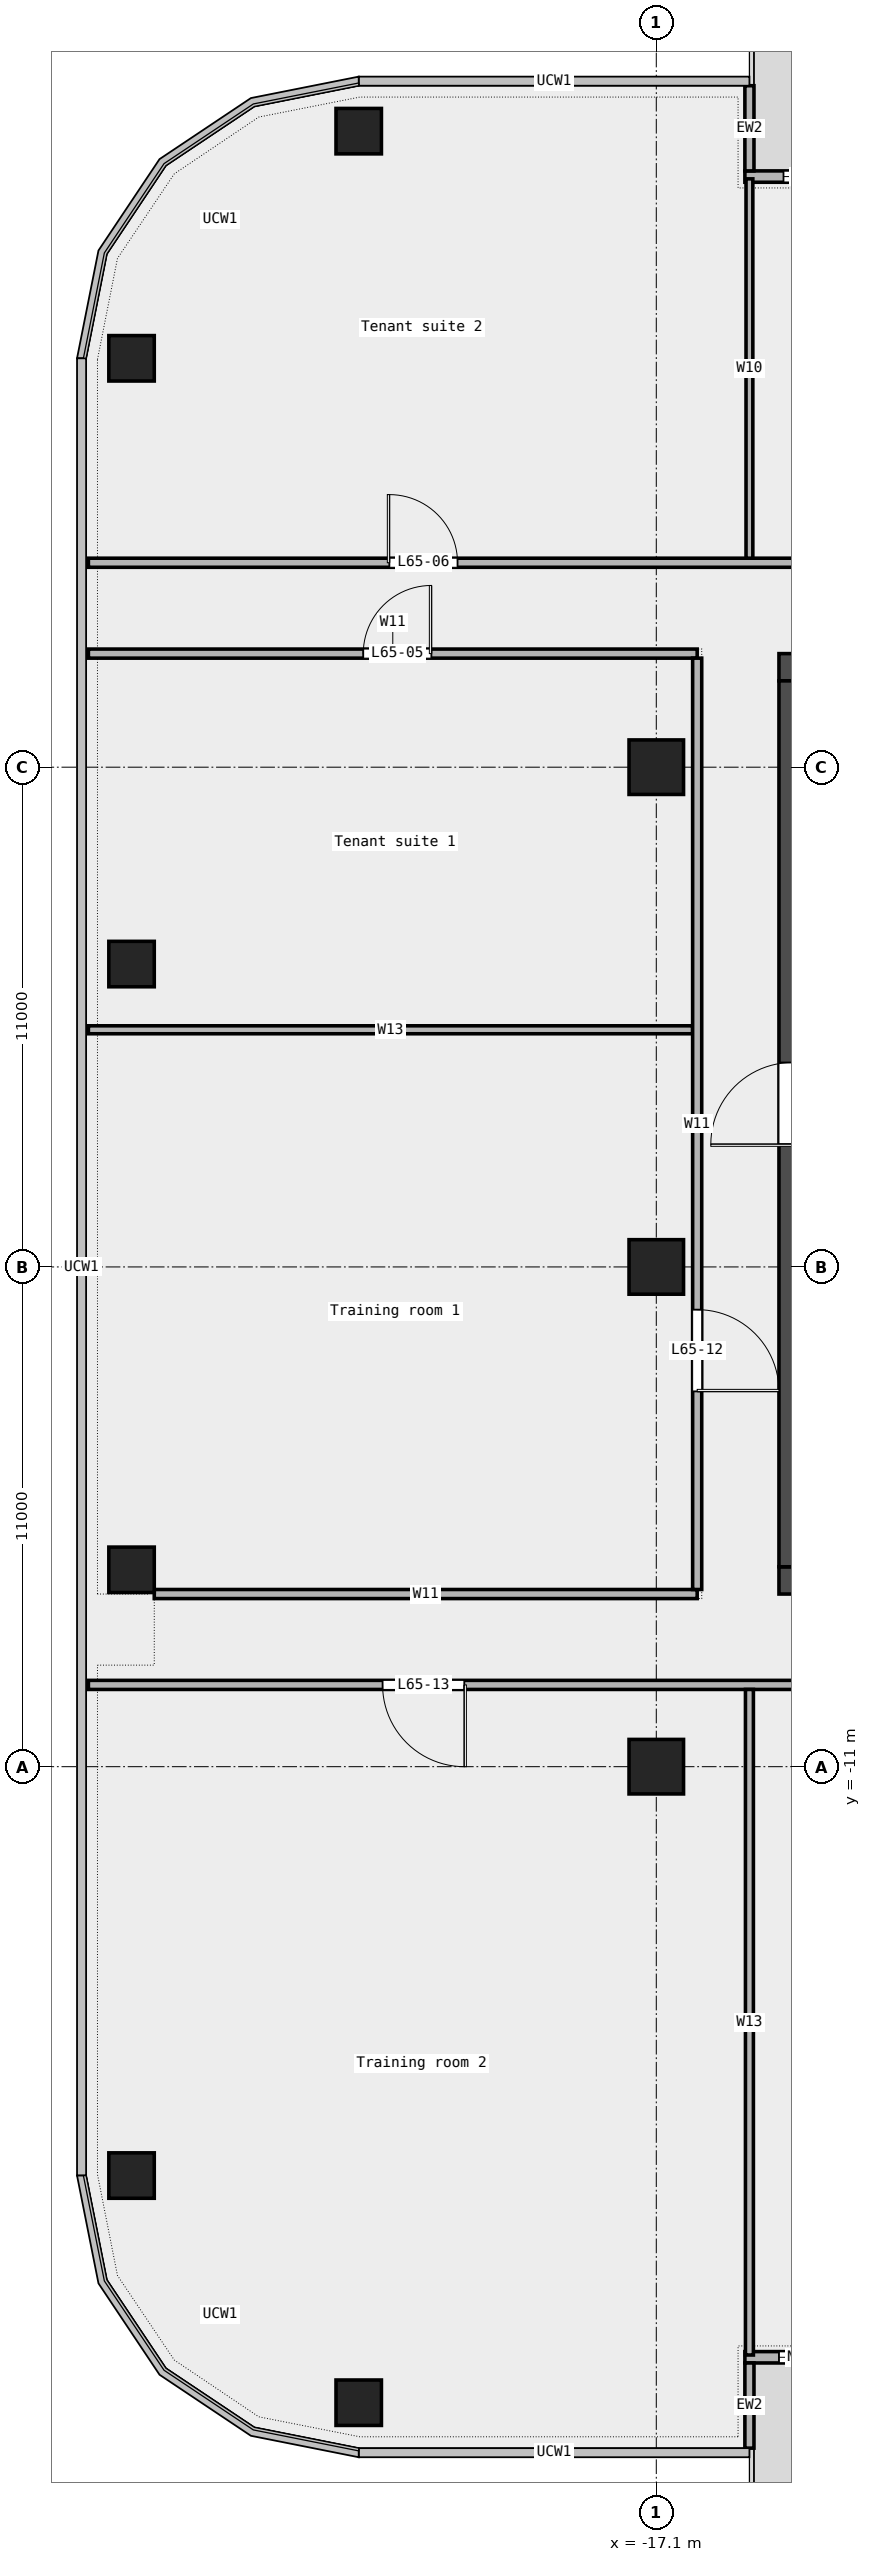
"""IFC4 building model, lengths in metres.
Left out: names, types, materials, properties, quantities, classifications, styles, units other than length and angle.
Written with IfcOpenShell. Run it as: python <this file> out.ifc"""

import sys

from ifc_helpers import new_model, si_unit, direction, frame, frame_2d, origin, origin_2d, place, context, subcontext, project, spatial, rectangle, extrude, element, fill, save


model = new_model("IFC4")
c1 = context("Model", 3, precision=1e-05, world=origin(), true_north=direction((0.0, 1.0)))
c2 = subcontext(c1, "Body", "Model", "MODEL_VIEW")
j1 = project(units=[si_unit("LENGTHUNIT", "METRE"), si_unit("PLANEANGLEUNIT", "RADIAN")], contexts=[c1])
p1 = place(None, origin())
s1 = spatial("IfcSite", under=j1, at=p1, CompositionType="ELEMENT")
p2 = place(p1, origin())
s2 = spatial("IfcBuilding", under=s1, at=p2, CompositionType="ELEMENT")
p3 = place(p2, frame((0.0, 0.0, 299.4)))
s3 = spatial("IfcBuildingStorey", under=s2, at=p3, CompositionType="ELEMENT", Elevation=299.4)
for number, where, z_axis, x_axis in (
    (1, (-23.65, -25.0, 0.0), (0.0, 0.0, 1.0), (1.0, 0.0, 0.0)),
    (2, (-23.65, 25.0, 0.0), (0.0, 0.0, 1.0), (1.0, 0.0, 0.0)),
    (3, (-28.65, 20.0, 0.0), (0.0, 0.0, 1.0), (1.0, 0.0, 0.0)),
    (4, (-28.65, 6.667, 0.0), (0.0, 0.0, 1.0), (1.0, 0.0, 0.0)),
    (5, (-28.65, -6.667, 0.0), (0.0, 0.0, 1.0), (1.0, 0.0, 0.0)),
    (6, (-28.65, -20.0, 0.0), (0.0, 0.0, 1.0), (1.0, 0.0, 0.0)),
):
    element("IfcColumn", number, at=place(p3, frame(where, z_axis=z_axis, x_axis=x_axis)), inside=s3, PredefinedType="COLUMN", context=c2, shape_type="SweptSolid", body=[
        extrude(rectangle(XDim=1.0, YDim=1.0, at=origin_2d()), origin(), (0.0, 0.0, 1.0), 3.6),
    ])
for number, where, z_axis, x_axis in (
    (7, (-17.1, -11.0, 0.0), (0.0, 0.0, 1.0), (1.0, 0.0, 0.0)),
    (8, (-17.1, 0.0, 0.0), (0.0, 0.0, 1.0), (1.0, 0.0, 0.0)),
    (9, (-17.1, 11.0, 0.0), (0.0, 0.0, 1.0), (1.0, 0.0, 0.0)),
):
    element("IfcColumn", number, at=place(p3, frame(where, z_axis=z_axis, x_axis=x_axis)), inside=s3, PredefinedType="COLUMN", context=c2, shape_type="SweptSolid", body=[
        extrude(rectangle(XDim=1.2, YDim=1.2, at=origin_2d()), origin(), (0.0, 0.0, 1.0), 3.6),
    ])
p4 = place(p3, frame((-2.05, 24.0, 0.0), z_axis=(0.0, 0.0, 1.0), x_axis=(-1.0, 0.0, 0.0)))
e10 = element("IfcWall", 10, at=p4, inside=s3, PredefinedType="STANDARD", context=c2, shape_type="SweptSolid", body=[
    extrude(rectangle(XDim=13.1, YDim=0.25, at=frame_2d((6.55, 0.0))), origin(), (0.0, 0.0, 1.0), 3.6),
])
p5 = place(p4, frame((1.5, 0.0, 0.45)))
e11 = element("IfcOpeningElement", 11, at=p5, cuts=e10, PredefinedType="OPENING", context=c2, shape_type="SweptSolid", body=[
    extrude(rectangle(XDim=1.5, YDim=2.4, at=frame_2d((0.75, 1.2))), frame((0.0, 0.137, 0.0), z_axis=(0.0, -1.0, 0.0), x_axis=(1.0, 0.0, 0.0)), (0.0, 0.0, 1.0), 0.274),
])
p6 = place(p4, frame((5.75, 0.0, 0.0)))
e12 = element("IfcOpeningElement", 12, at=p6, cuts=e10, PredefinedType="OPENING", context=c2, shape_type="SweptSolid", body=[
    extrude(rectangle(XDim=1.8, YDim=2.4, at=frame_2d((0.9, 1.2))), frame((0.0, 0.137, 0.0), z_axis=(0.0, -1.0, 0.0), x_axis=(1.0, 0.0, 0.0)), (0.0, 0.0, 1.0), 0.274),
])
p7 = place(p4, frame((10.75, 0.0, 0.45)))
e13 = element("IfcOpeningElement", 13, at=p7, cuts=e10, PredefinedType="OPENING", context=c2, shape_type="SweptSolid", body=[
    extrude(rectangle(XDim=1.5, YDim=2.4, at=frame_2d((0.75, 1.2))), frame((0.0, 0.137, 0.0), z_axis=(0.0, -1.0, 0.0), x_axis=(1.0, 0.0, 0.0)), (0.0, 0.0, 1.0), 0.274),
])
p8 = place(p3, frame((-15.05, 26.0, 0.0), z_axis=(0.0, 0.0, 1.0), x_axis=(0.0, -1.0, 0.0)))
e14 = element("IfcWall", 14, at=p8, inside=s3, PredefinedType="STANDARD", context=c2, shape_type="SweptSolid", body=[
    extrude(rectangle(XDim=1.875, YDim=0.2, at=frame_2d((0.938, 0.0))), origin(), (0.0, 0.0, 1.0), 3.6),
])
p9 = place(p3, frame((-15.15, -24.0, 0.0), z_axis=(0.0, 0.0, 1.0), x_axis=(1.0, 0.0, 0.0)))
e15 = element("IfcWall", 15, at=p9, inside=s3, PredefinedType="STANDARD", context=c2, shape_type="SweptSolid", body=[
    extrude(rectangle(XDim=13.1, YDim=0.25, at=frame_2d((6.55, 0.0))), origin(), (0.0, 0.0, 1.0), 3.6),
])
p10 = place(p9, frame((0.75, 0.0, 0.45)))
e16 = element("IfcOpeningElement", 16, at=p10, cuts=e15, PredefinedType="OPENING", context=c2, shape_type="SweptSolid", body=[
    extrude(rectangle(XDim=1.5, YDim=2.4, at=frame_2d((0.75, 1.2))), frame((0.0, 0.137, 0.0), z_axis=(0.0, -1.0, 0.0), x_axis=(1.0, 0.0, 0.0)), (0.0, 0.0, 1.0), 0.274),
])
p11 = place(p9, frame((5.75, 0.0, 0.0)))
e17 = element("IfcOpeningElement", 17, at=p11, cuts=e15, PredefinedType="OPENING", context=c2, shape_type="SweptSolid", body=[
    extrude(rectangle(XDim=1.8, YDim=2.4, at=frame_2d((0.9, 1.2))), frame((0.0, 0.137, 0.0), z_axis=(0.0, -1.0, 0.0), x_axis=(1.0, 0.0, 0.0)), (0.0, 0.0, 1.0), 0.274),
])
p12 = place(p9, frame((10.0, 0.0, 0.45)))
e18 = element("IfcOpeningElement", 18, at=p12, cuts=e15, PredefinedType="OPENING", context=c2, shape_type="SweptSolid", body=[
    extrude(rectangle(XDim=1.5, YDim=2.4, at=frame_2d((0.75, 1.2))), frame((0.0, 0.137, 0.0), z_axis=(0.0, -1.0, 0.0), x_axis=(1.0, 0.0, 0.0)), (0.0, 0.0, 1.0), 0.274),
])
p13 = place(p3, frame((-15.05, -26.0, 0.0), z_axis=(0.0, 0.0, 1.0), x_axis=(0.0, 1.0, 0.0)))
e19 = element("IfcWall", 19, at=p13, inside=s3, PredefinedType="STANDARD", context=c2, shape_type="SweptSolid", body=[
    extrude(rectangle(XDim=1.875, YDim=0.2, at=frame_2d((0.938, 0.0))), origin(), (0.0, 0.0, 1.0), 3.6),
])
p14 = place(p3, frame((-29.6, -9.2, 0.0), z_axis=(0.0, 0.0, 1.0), x_axis=(1.0, 0.0, 0.0)))
e20 = element("IfcWall", 20, at=p14, inside=s3, PredefinedType="PARTITIONING", context=c2, shape_type="SweptSolid", body=[
    extrude(rectangle(XDim=59.2, YDim=0.2, at=frame_2d((29.6, 0.0))), origin(), (0.0, 0.0, 1.0), 3.6),
])
p15 = place(p14, frame((48.905, 0.0, 0.0)))
e21 = element("IfcOpeningElement", 21, at=p15, cuts=e20, PredefinedType="OPENING", context=c2, shape_type="SweptSolid", body=[
    extrude(rectangle(XDim=1.8, YDim=2.1, at=frame_2d((0.9, 1.05))), frame((0.0, 0.112, 0.0), z_axis=(0.0, -1.0, 0.0), x_axis=(1.0, 0.0, 0.0)), (0.0, 0.0, 1.0), 0.224),
])
p16 = place(p14, frame((36.205, 0.0, 0.0)))
e22 = element("IfcOpeningElement", 22, at=p16, cuts=e20, PredefinedType="OPENING", context=c2, shape_type="SweptSolid", body=[
    extrude(rectangle(XDim=1.8, YDim=2.1, at=frame_2d((0.9, 1.05))), frame((0.0, 0.112, 0.0), z_axis=(0.0, -1.0, 0.0), x_axis=(1.0, 0.0, 0.0)), (0.0, 0.0, 1.0), 0.224),
])
p17 = place(p14, frame((20.1, 0.0, 0.0)))
e23 = element("IfcOpeningElement", 23, at=p17, cuts=e20, PredefinedType="OPENING", context=c2, shape_type="SweptSolid", body=[
    extrude(rectangle(XDim=1.8, YDim=2.1, at=frame_2d((0.9, 1.05))), frame((0.0, 0.112, 0.0), z_axis=(0.0, -1.0, 0.0), x_axis=(1.0, 0.0, 0.0)), (0.0, 0.0, 1.0), 0.224),
])
p18 = place(p14, frame((6.475, 0.0, 0.0)))
e24 = element("IfcOpeningElement", 24, at=p18, cuts=e20, PredefinedType="OPENING", context=c2, shape_type="SweptSolid", body=[
    extrude(rectangle(XDim=1.8, YDim=2.1, at=frame_2d((0.9, 1.05))), frame((0.0, 0.112, 0.0), z_axis=(0.0, -1.0, 0.0), x_axis=(1.0, 0.0, 0.0)), (0.0, 0.0, 1.0), 0.224),
])
p19 = place(p14, frame((28.425, 0.0, 0.0)))
e25 = element("IfcOpeningElement", 25, at=p19, cuts=e20, PredefinedType="OPENING", context=c2, shape_type="SweptSolid", body=[
    extrude(rectangle(XDim=1.2, YDim=2.1, at=frame_2d((0.6, 1.05))), frame((0.0, 0.112, 0.0), z_axis=(0.0, -1.0, 0.0), x_axis=(1.0, 0.0, 0.0)), (0.0, 0.0, 1.0), 0.224),
])
p20 = place(p3, frame((-28.15, -7.2, 0.0), z_axis=(0.0, 0.0, 1.0), x_axis=(1.0, 0.0, 0.0)))
e26 = element("IfcWall", 26, at=p20, inside=s3, PredefinedType="PARTITIONING", context=c2, shape_type="SweptSolid", body=[
    extrude(rectangle(XDim=11.95, YDim=0.2, at=frame_2d((5.975, 0.0))), origin(), (0.0, 0.0, 1.0), 3.6),
])
p21 = place(p3, frame((-29.6, 5.22, 0.0), z_axis=(0.0, 0.0, 1.0), x_axis=(1.0, 0.0, 0.0)))
e27 = element("IfcWall", 27, at=p21, inside=s3, PredefinedType="PARTITIONING", context=c2, shape_type="SweptSolid", body=[
    extrude(rectangle(XDim=13.3, YDim=0.175, at=frame_2d((6.65, 0.0))), origin(), (0.0, 0.0, 1.0), 3.6),
])
p22 = place(p3, frame((-29.6, 13.5, 0.0), z_axis=(0.0, 0.0, 1.0), x_axis=(1.0, 0.0, 0.0)))
e28 = element("IfcWall", 28, at=p22, inside=s3, PredefinedType="PARTITIONING", context=c2, shape_type="SweptSolid", body=[
    extrude(rectangle(XDim=13.4, YDim=0.2, at=frame_2d((6.7, 0.0))), origin(), (0.0, 0.0, 1.0), 3.6),
])
p23 = place(p22, frame((6.05, 0.0, 0.0)))
e29 = element("IfcOpeningElement", 29, at=p23, cuts=e28, PredefinedType="OPENING", context=c2, shape_type="SweptSolid", body=[
    extrude(rectangle(XDim=1.5, YDim=2.1, at=frame_2d((0.75, 1.05))), frame((0.0, 0.112, 0.0), z_axis=(0.0, -1.0, 0.0), x_axis=(1.0, 0.0, 0.0)), (0.0, 0.0, 1.0), 0.224),
])
p24 = place(p3, frame((-29.6, 15.5, 0.0), z_axis=(0.0, 0.0, 1.0), x_axis=(1.0, 0.0, 0.0)))
e30 = element("IfcWall", 30, at=p24, inside=s3, PredefinedType="PARTITIONING", context=c2, shape_type="SweptSolid", body=[
    extrude(rectangle(XDim=59.2, YDim=0.2, at=frame_2d((29.6, 0.0))), origin(), (0.0, 0.0, 1.0), 3.6),
])
p25 = place(p24, frame((48.3, 0.0, 0.0)))
e31 = element("IfcOpeningElement", 31, at=p25, cuts=e30, PredefinedType="OPENING", context=c2, shape_type="SweptSolid", body=[
    extrude(rectangle(XDim=1.8, YDim=2.1, at=frame_2d((0.9, 1.05))), frame((0.0, 0.112, 0.0), z_axis=(0.0, -1.0, 0.0), x_axis=(1.0, 0.0, 0.0)), (0.0, 0.0, 1.0), 0.224),
])
p26 = place(p24, frame((32.675, 0.0, 0.0)))
e32 = element("IfcOpeningElement", 32, at=p26, cuts=e30, PredefinedType="OPENING", context=c2, shape_type="SweptSolid", body=[
    extrude(rectangle(XDim=1.5, YDim=2.1, at=frame_2d((0.75, 1.05))), frame((0.0, 0.112, 0.0), z_axis=(0.0, -1.0, 0.0), x_axis=(1.0, 0.0, 0.0)), (0.0, 0.0, 1.0), 0.224),
])
p27 = place(p24, frame((6.625, 0.0, 0.0)))
e33 = element("IfcOpeningElement", 33, at=p27, cuts=e30, PredefinedType="OPENING", context=c2, shape_type="SweptSolid", body=[
    extrude(rectangle(XDim=1.5, YDim=2.1, at=frame_2d((0.75, 1.05))), frame((0.0, 0.112, 0.0), z_axis=(0.0, -1.0, 0.0), x_axis=(1.0, 0.0, 0.0)), (0.0, 0.0, 1.0), 0.224),
])
p28 = place(p24, frame((20.25, 0.0, 0.0)))
e34 = element("IfcOpeningElement", 34, at=p28, cuts=e30, PredefinedType="OPENING", context=c2, shape_type="SweptSolid", body=[
    extrude(rectangle(XDim=1.5, YDim=2.1, at=frame_2d((0.75, 1.05))), frame((0.0, 0.112, 0.0), z_axis=(0.0, -1.0, 0.0), x_axis=(1.0, 0.0, 0.0)), (0.0, 0.0, 1.0), 0.224),
])
p29 = place(p3, frame((-16.2, -7.1, 0.0), z_axis=(0.0, 0.0, 1.0), x_axis=(0.0, 1.0, 0.0)))
e35 = element("IfcWall", 35, at=p29, inside=s3, PredefinedType="PARTITIONING", context=c2, shape_type="SweptSolid", body=[
    extrude(rectangle(XDim=20.5, YDim=0.2, at=frame_2d((10.25, 0.0))), origin(), (0.0, 0.0, 1.0), 3.6),
])
p30 = place(p29, frame((4.36, 0.0, 0.0)))
e36 = element("IfcOpeningElement", 36, at=p30, cuts=e35, PredefinedType="OPENING", context=c2, shape_type="SweptSolid", body=[
    extrude(rectangle(XDim=1.8, YDim=2.1, at=frame_2d((0.9, 1.05))), frame((0.0, 0.112, 0.0), z_axis=(0.0, -1.0, 0.0), x_axis=(1.0, 0.0, 0.0)), (0.0, 0.0, 1.0), 0.224),
])
p31 = place(p3, frame((-15.05, 15.6, 0.0), z_axis=(0.0, 0.0, 1.0), x_axis=(0.0, 1.0, 0.0)))
e37 = element("IfcWall", 37, at=p31, inside=s3, PredefinedType="PARTITIONING", context=c2, shape_type="SweptSolid", body=[
    extrude(rectangle(XDim=8.35, YDim=0.15, at=frame_2d((4.175, 0.0))), origin(), (0.0, 0.0, 1.0), 3.6),
])
p32 = place(p3, frame((-15.05, -23.95, 0.0), z_axis=(0.0, 0.0, 1.0), x_axis=(0.0, 1.0, 0.0)))
e38 = element("IfcWall", 38, at=p32, inside=s3, PredefinedType="PARTITIONING", context=c2, shape_type="SweptSolid", body=[
    extrude(rectangle(XDim=14.65, YDim=0.175, at=frame_2d((7.325, 0.0))), origin(), (0.0, 0.0, 1.0), 3.6),
])
p33 = place(p3, frame((-14.4, -6.9, 0.0), z_axis=(0.0, 0.0, 1.0), x_axis=(1.0, 0.0, 0.0)))
e39 = element("IfcWall", 39, at=p33, inside=s3, PredefinedType="SHEAR", context=c2, shape_type="SweptSolid", body=[
    extrude(rectangle(XDim=28.8, YDim=0.6, at=frame_2d((14.4, 0.0))), origin(), (0.0, 0.0, 1.0), 3.7),
])
p34 = place(p33, frame((4.712, 0.0, 0.0)))
e40 = element("IfcOpeningElement", 40, at=p34, cuts=e39, PredefinedType="OPENING", context=c2, shape_type="SweptSolid", body=[
    extrude(rectangle(XDim=1.0, YDim=2.1, at=frame_2d((0.5, 1.05))), frame((0.0, 0.312, 0.0), z_axis=(0.0, -1.0, 0.0), x_axis=(1.0, 0.0, 0.0)), (0.0, 0.0, 1.0), 0.624),
])
p35 = place(p33, frame((9.675, 0.0, 0.0)))
e41 = element("IfcOpeningElement", 41, at=p35, cuts=e39, PredefinedType="OPENING", context=c2, shape_type="SweptSolid", body=[
    extrude(rectangle(XDim=1.2, YDim=2.1, at=frame_2d((0.6, 1.05))), frame((0.0, 0.312, 0.0), z_axis=(0.0, -1.0, 0.0), x_axis=(1.0, 0.0, 0.0)), (0.0, 0.0, 1.0), 0.624),
])
p36 = place(p33, frame((15.025, 0.0, 0.0)))
e42 = element("IfcOpeningElement", 42, at=p36, cuts=e39, PredefinedType="OPENING", context=c2, shape_type="SweptSolid", body=[
    extrude(rectangle(XDim=1.0, YDim=2.1, at=frame_2d((0.5, 1.05))), frame((0.0, 0.312, 0.0), z_axis=(0.0, -1.0, 0.0), x_axis=(1.0, 0.0, 0.0)), (0.0, 0.0, 1.0), 0.624),
])
p37 = place(p33, frame((18.75, 0.0, 0.0)))
e43 = element("IfcOpeningElement", 43, at=p37, cuts=e39, PredefinedType="OPENING", context=c2, shape_type="SweptSolid", body=[
    extrude(rectangle(XDim=1.8, YDim=2.1, at=frame_2d((0.9, 1.05))), frame((0.0, 0.312, 0.0), z_axis=(0.0, -1.0, 0.0), x_axis=(1.0, 0.0, 0.0)), (0.0, 0.0, 1.0), 0.624),
])
p38 = place(p33, frame((23.087, 0.0, 0.0)))
e44 = element("IfcOpeningElement", 44, at=p38, cuts=e39, PredefinedType="OPENING", context=c2, shape_type="SweptSolid", body=[
    extrude(rectangle(XDim=1.0, YDim=2.1, at=frame_2d((0.5, 1.05))), frame((0.0, 0.312, 0.0), z_axis=(0.0, -1.0, 0.0), x_axis=(1.0, 0.0, 0.0)), (0.0, 0.0, 1.0), 0.624),
])
p39 = place(p3, frame((-14.4, 13.2, 0.0), z_axis=(0.0, 0.0, 1.0), x_axis=(1.0, 0.0, 0.0)))
e45 = element("IfcWall", 45, at=p39, inside=s3, PredefinedType="SHEAR", context=c2, shape_type="SweptSolid", body=[
    extrude(rectangle(XDim=28.8, YDim=0.6, at=frame_2d((14.4, 0.0))), origin(), (0.0, 0.0, 1.0), 3.7),
])
p40 = place(p39, frame((6.3, 0.0, 0.0)))
e46 = element("IfcOpeningElement", 46, at=p40, cuts=e45, PredefinedType="OPENING", context=c2, shape_type="SweptSolid", body=[
    extrude(rectangle(XDim=1.2, YDim=2.1, at=frame_2d((0.6, 1.05))), frame((0.0, 0.312, 0.0), z_axis=(0.0, -1.0, 0.0), x_axis=(1.0, 0.0, 0.0)), (0.0, 0.0, 1.0), 0.624),
])
p41 = place(p39, frame((21.3, 0.0, 0.0)))
e47 = element("IfcOpeningElement", 47, at=p41, cuts=e45, PredefinedType="OPENING", context=c2, shape_type="SweptSolid", body=[
    extrude(rectangle(XDim=1.2, YDim=2.1, at=frame_2d((0.6, 1.05))), frame((0.0, 0.312, 0.0), z_axis=(0.0, -1.0, 0.0), x_axis=(1.0, 0.0, 0.0)), (0.0, 0.0, 1.0), 0.624),
])
p42 = place(p3, frame((-14.1, -6.6, 0.0), z_axis=(0.0, 0.0, 1.0), x_axis=(0.0, 1.0, 0.0)))
e48 = element("IfcWall", 48, at=p42, inside=s3, PredefinedType="SHEAR", context=c2, shape_type="SweptSolid", body=[
    extrude(rectangle(XDim=19.5, YDim=0.6, at=frame_2d((9.75, 0.0))), origin(), (0.0, 0.0, 1.0), 3.7),
])
p43 = place(p42, frame((9.3, 0.0, 0.0)))
e49 = element("IfcOpeningElement", 49, at=p43, cuts=e48, PredefinedType="OPENING", context=c2, shape_type="SweptSolid", body=[
    extrude(rectangle(XDim=1.8, YDim=2.1, at=frame_2d((0.9, 1.05))), frame((0.0, 0.312, 0.0), z_axis=(0.0, -1.0, 0.0), x_axis=(1.0, 0.0, 0.0)), (0.0, 0.0, 1.0), 0.624),
])
p44 = place(p7, origin())
e50 = element("IfcWindow", 50, at=p44, inside=s3, PartitioningType="SINGLE_PANEL", PredefinedType="WINDOW", context=c2, shape_type="SweptSolid", body=[
    extrude(rectangle(XDim=1.5, YDim=2.4, at=frame_2d((0.75, 1.2))), frame((0.0, 0.03, 0.0), z_axis=(0.0, -1.0, 0.0), x_axis=(1.0, 0.0, 0.0)), (0.0, 0.0, 1.0), 0.06),
])
fill(e13, e50)
p45 = place(p10, origin())
e51 = element("IfcWindow", 51, at=p45, inside=s3, PartitioningType="SINGLE_PANEL", PredefinedType="WINDOW", context=c2, shape_type="SweptSolid", body=[
    extrude(rectangle(XDim=1.5, YDim=2.4, at=frame_2d((0.75, 1.2))), frame((0.0, 0.03, 0.0), z_axis=(0.0, -1.0, 0.0), x_axis=(1.0, 0.0, 0.0)), (0.0, 0.0, 1.0), 0.06),
])
fill(e16, e51)
p46 = place(p23, origin())
e52 = element("IfcDoor", 52, at=p46, inside=s3, OperationType="DOUBLE_DOOR_SINGLE_SWING", PredefinedType="DOOR", context=c2, shape_type="SweptSolid", body=[
    extrude(rectangle(XDim=1.5, YDim=2.1, at=frame_2d((0.75, 1.05))), frame((0.0, 0.025, 0.0), z_axis=(0.0, -1.0, 0.0), x_axis=(1.0, 0.0, 0.0)), (0.0, 0.0, 1.0), 0.05),
])
fill(e29, e52)
p47 = place(p27, origin())
e53 = element("IfcDoor", 53, at=p47, inside=s3, OperationType="DOUBLE_DOOR_SINGLE_SWING", PredefinedType="DOOR", context=c2, shape_type="SweptSolid", body=[
    extrude(rectangle(XDim=1.5, YDim=2.1, at=frame_2d((0.75, 1.05))), frame((0.0, 0.025, 0.0), z_axis=(0.0, -1.0, 0.0), x_axis=(1.0, 0.0, 0.0)), (0.0, 0.0, 1.0), 0.05),
])
fill(e33, e53)
p48 = place(p30, origin())
e54 = element("IfcDoor", 54, at=p48, inside=s3, OperationType="DOUBLE_DOOR_SINGLE_SWING", PredefinedType="DOOR", context=c2, shape_type="SweptSolid", body=[
    extrude(rectangle(XDim=1.8, YDim=2.1, at=frame_2d((0.9, 1.05))), frame((0.0, 0.025, 0.0), z_axis=(0.0, -1.0, 0.0), x_axis=(1.0, 0.0, 0.0)), (0.0, 0.0, 1.0), 0.05),
])
fill(e36, e54)
p49 = place(p18, origin())
e55 = element("IfcDoor", 55, at=p49, inside=s3, OperationType="DOUBLE_DOOR_SINGLE_SWING", PredefinedType="DOOR", context=c2, shape_type="SweptSolid", body=[
    extrude(rectangle(XDim=1.8, YDim=2.1, at=frame_2d((0.9, 1.05))), frame((0.0, 0.025, 0.0), z_axis=(0.0, -1.0, 0.0), x_axis=(1.0, 0.0, 0.0)), (0.0, 0.0, 1.0), 0.05),
])
fill(e24, e55)
save(model, sys.argv[1])
